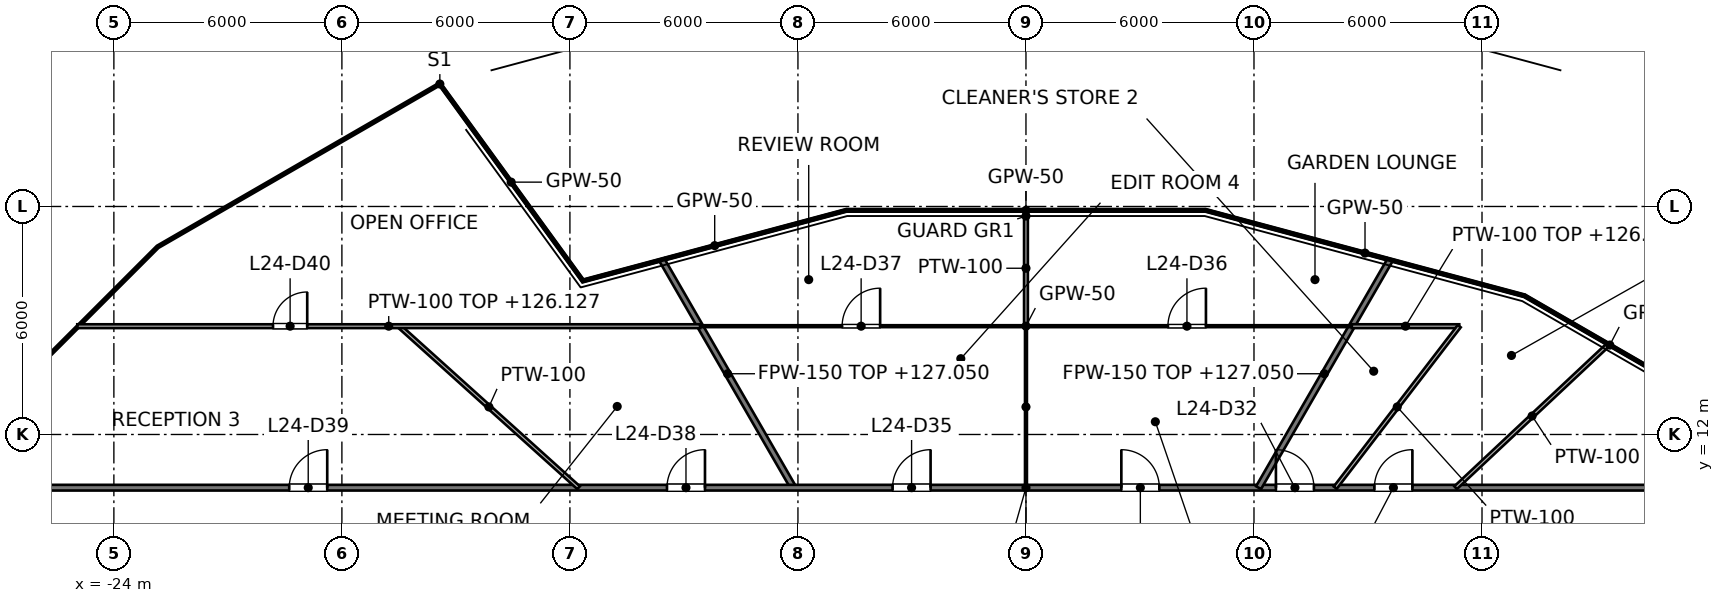
"""IFC4 building model, lengths in metres.
Left out: names, types, materials, properties, quantities, classifications, styles, units other than length and angle.
Written with IfcOpenShell. Run it as: python <this file> out.ifc"""

import sys

from ifc_helpers import new_model, si_unit, direction, frame, frame_2d, origin, place, context, subcontext, project, spatial, rectangle, extrude, element, fill, save


model = new_model("IFC4")
c1 = context("Model", 3, precision=1e-05, world=origin(), true_north=direction((0.0, 1.0)))
c2 = subcontext(c1, "Body", "Model", "MODEL_VIEW")
j1 = project(units=[si_unit("LENGTHUNIT", "METRE"), si_unit("PLANEANGLEUNIT", "RADIAN")], contexts=[c1])
p1 = place(None, origin())
s1 = spatial("IfcSite", under=j1, at=p1, CompositionType="ELEMENT")
p2 = place(p1, origin())
s2 = spatial("IfcBuilding", under=s1, at=p2, CompositionType="ELEMENT")
p3 = place(p2, frame((0.0, 0.0, 123.0)))
s3 = spatial("IfcBuildingStorey", under=s2, at=p3, CompositionType="ELEMENT", Elevation=123.0)
p4 = place(p3, frame((-9.582, 16.597, 0.0), z_axis=(0.0, 0.0, 1.0), x_axis=(0.500014420154, -0.866017078145, 0.0)))
e1 = element("IfcWall", 1, at=p4, inside=s3, PredefinedType="PARTITIONING", context=c2, shape_type="SweptSolid", body=[
    extrude(rectangle(XDim=6.925, YDim=0.15, at=frame_2d((3.462, 0.0))), origin(), (0.0, 0.0, 1.0), 4.05),
])
p5 = place(p3, frame((-26.0, 10.6, 0.0), z_axis=(0.0, 0.0, 1.0), x_axis=(1.0, 0.0, 0.0)))
e2 = element("IfcWall", 2, at=p5, inside=s3, PredefinedType="PARTITIONING", context=c2, shape_type="SweptSolid", body=[
    extrude(rectangle(XDim=52.0, YDim=0.15, at=frame_2d((26.0, 0.0))), origin(), (0.0, 0.0, 1.0), 3.127),
])
p6 = place(p5, frame((44.053, 0.0, 0.0)))
e3 = element("IfcOpeningElement", 3, at=p6, cuts=e2, PredefinedType="OPENING", context=c2, shape_type="SweptSolid", body=[
    extrude(rectangle(XDim=1.2, YDim=2.1, at=frame_2d((0.6, 1.05))), frame((0.0, 0.075, 0.0), z_axis=(0.0, -1.0, 0.0), x_axis=(1.0, 0.0, 0.0)), (0.0, 0.0, 1.0), 0.15),
])
p7 = place(p5, frame((35.168, 0.0, 0.0)))
e4 = element("IfcOpeningElement", 4, at=p7, cuts=e2, PredefinedType="OPENING", context=c2, shape_type="SweptSolid", body=[
    extrude(rectangle(XDim=1.0, YDim=2.1, at=frame_2d((0.5, 1.05))), frame((0.0, 0.075, 0.0), z_axis=(0.0, -1.0, 0.0), x_axis=(1.0, 0.0, 0.0)), (0.0, 0.0, 1.0), 0.15),
])
p8 = place(p5, frame((32.577, 0.0, 0.0)))
e5 = element("IfcOpeningElement", 5, at=p8, cuts=e2, PredefinedType="OPENING", context=c2, shape_type="SweptSolid", body=[
    extrude(rectangle(XDim=1.0, YDim=2.1, at=frame_2d((0.5, 1.05))), frame((0.0, 0.075, 0.0), z_axis=(0.0, -1.0, 0.0), x_axis=(1.0, 0.0, 0.0)), (0.0, 0.0, 1.0), 0.15),
])
p9 = place(p5, frame((28.51, 0.0, 0.0)))
e6 = element("IfcOpeningElement", 6, at=p9, cuts=e2, PredefinedType="OPENING", context=c2, shape_type="SweptSolid", body=[
    extrude(rectangle(XDim=1.0, YDim=2.1, at=frame_2d((0.5, 1.05))), frame((0.0, 0.075, 0.0), z_axis=(0.0, -1.0, 0.0), x_axis=(1.0, 0.0, 0.0)), (0.0, 0.0, 1.0), 0.15),
])
p10 = place(p5, frame((22.49, 0.0, 0.0)))
e7 = element("IfcOpeningElement", 7, at=p10, cuts=e2, PredefinedType="OPENING", context=c2, shape_type="SweptSolid", body=[
    extrude(rectangle(XDim=1.0, YDim=2.1, at=frame_2d((0.5, 1.05))), frame((0.0, 0.075, 0.0), z_axis=(0.0, -1.0, 0.0), x_axis=(1.0, 0.0, 0.0)), (0.0, 0.0, 1.0), 0.15),
])
p11 = place(p5, frame((16.554, 0.0, 0.0)))
e8 = element("IfcOpeningElement", 8, at=p11, cuts=e2, PredefinedType="OPENING", context=c2, shape_type="SweptSolid", body=[
    extrude(rectangle(XDim=1.0, YDim=2.1, at=frame_2d((0.5, 1.05))), frame((0.0, 0.075, 0.0), z_axis=(0.0, -1.0, 0.0), x_axis=(1.0, 0.0, 0.0)), (0.0, 0.0, 1.0), 0.15),
])
p12 = place(p5, frame((6.614, 0.0, 0.0)))
e9 = element("IfcOpeningElement", 9, at=p12, cuts=e2, PredefinedType="OPENING", context=c2, shape_type="SweptSolid", body=[
    extrude(rectangle(XDim=1.0, YDim=2.1, at=frame_2d((0.5, 1.05))), frame((0.0, 0.075, 0.0), z_axis=(0.0, -1.0, 0.0), x_axis=(1.0, 0.0, 0.0)), (0.0, 0.0, 1.0), 0.15),
])
p13 = place(p3, frame((6.12, 10.6, 0.0), z_axis=(0.0, 0.0, 1.0), x_axis=(0.500029687554, 0.866008262989, 0.0)))
e10 = element("IfcWall", 10, at=p13, inside=s3, PredefinedType="PARTITIONING", context=c2, shape_type="SweptSolid", body=[
    extrude(rectangle(XDim=6.924, YDim=0.15, at=frame_2d((3.462, 0.0))), origin(), (0.0, 0.0, 1.0), 4.05),
])
p14 = place(p3, frame((-15.435, 21.24, 0.0), z_axis=(0.0, 0.0, 1.0), x_axis=(0.587866723906, -0.808957795514, 0.0)))
e11 = element("IfcWall", 11, at=p14, inside=s3, PredefinedType="PARTITIONING", context=c2, shape_type="SweptSolid", body=[
    extrude(rectangle(XDim=6.427, YDim=0.05, at=frame_2d((3.213, 0.0))), origin(), (0.0, 0.0, 1.0), 3.127),
])
p15 = place(p3, frame((13.119, 15.649, 0.0), z_axis=(0.0, 0.0, 1.0), x_axis=(0.866054574236, -0.499949471892, 0.0)))
e12 = element("IfcWall", 12, at=p15, inside=s3, PredefinedType="PARTITIONING", context=c2, shape_type="SweptSolid", body=[
    extrude(rectangle(XDim=5.182, YDim=0.05, at=frame_2d((2.591, 0.0))), origin(), (0.0, 0.0, 1.0), 3.127),
])
p16 = place(p3, frame((4.724, 17.899, 0.0), z_axis=(0.0, 0.0, 1.0), x_axis=(0.965907796442, -0.258886324037, 0.0)))
e13 = element("IfcWall", 13, at=p16, inside=s3, PredefinedType="PARTITIONING", context=c2, shape_type="SweptSolid", body=[
    extrude(rectangle(XDim=8.691, YDim=0.05, at=frame_2d((4.346, 0.0))), origin(), (0.0, 0.0, 1.0), 3.127),
])
p17 = place(p3, frame((-8.573, 14.85, 0.0), z_axis=(0.0, 0.0, 1.0), x_axis=(1.0, 0.0, 0.0)))
e14 = element("IfcWall", 14, at=p17, inside=s3, PredefinedType="PARTITIONING", context=c2, shape_type="SweptSolid", body=[
    extrude(rectangle(XDim=17.146, YDim=0.05, at=frame_2d((8.573, 0.0))), origin(), (0.0, 0.0, 1.0), 3.127),
])
p18 = place(p17, frame((12.309, 0.0, 0.0)))
e15 = element("IfcOpeningElement", 15, at=p18, cuts=e14, PredefinedType="OPENING", context=c2, shape_type="SweptSolid", body=[
    extrude(rectangle(XDim=1.0, YDim=2.1, at=frame_2d((0.5, 1.05))), frame((0.0, 0.025, 0.0), z_axis=(0.0, -1.0, 0.0), x_axis=(1.0, 0.0, 0.0)), (0.0, 0.0, 1.0), 0.05),
])
p19 = place(p17, frame((3.736, 0.0, 0.0)))
e16 = element("IfcOpeningElement", 16, at=p19, cuts=e14, PredefinedType="OPENING", context=c2, shape_type="SweptSolid", body=[
    extrude(rectangle(XDim=1.0, YDim=2.1, at=frame_2d((0.5, 1.05))), frame((0.0, 0.025, 0.0), z_axis=(0.0, -1.0, 0.0), x_axis=(1.0, 0.0, 0.0)), (0.0, 0.0, 1.0), 0.05),
])
p20 = place(p3, frame((-4.724, 17.899, 0.0), z_axis=(0.0, 0.0, 1.0), x_axis=(1.0, 0.0, 0.0)))
e17 = element("IfcWall", 17, at=p20, inside=s3, PredefinedType="PARTITIONING", context=c2, shape_type="SweptSolid", body=[
    extrude(rectangle(XDim=9.448, YDim=0.05, at=frame_2d((4.724, 0.0))), origin(), (0.0, 0.0, 1.0), 3.127),
])
p21 = place(p3, frame((-11.657, 16.041, 0.0), z_axis=(0.0, 0.0, 1.0), x_axis=(0.965916924206, 0.258852265845, 0.0)))
e18 = element("IfcWall", 18, at=p21, inside=s3, PredefinedType="PARTITIONING", context=c2, shape_type="SweptSolid", body=[
    extrude(rectangle(XDim=7.177, YDim=0.05, at=frame_2d((3.589, 0.0))), origin(), (0.0, 0.0, 1.0), 3.127),
])
p22 = place(p3, frame((0.0, 10.6, 0.0), z_axis=(0.0, 0.0, 1.0), x_axis=(0.0, 1.0, 0.0)))
e19 = element("IfcWall", 19, at=p22, inside=s3, PredefinedType="PARTITIONING", context=c2, shape_type="SweptSolid", body=[
    extrude(rectangle(XDim=4.25, YDim=0.05, at=frame_2d((2.125, 0.0))), origin(), (0.0, 0.0, 1.0), 4.05),
])
p23 = place(p3, frame((-16.492, 14.85, 0.0), z_axis=(0.0, 0.0, 1.0), x_axis=(0.74313548605, -0.669140978698, 0.0)))
e20 = element("IfcWall", 20, at=p23, inside=s3, PredefinedType="PARTITIONING", context=c2, shape_type="SweptSolid", body=[
    extrude(rectangle(XDim=6.351, YDim=0.1, at=frame_2d((3.176, 0.0))), origin(), (0.0, 0.0, 1.0), 4.05),
])
p24 = place(p3, frame((-24.963, 14.85, 0.0), z_axis=(0.0, 0.0, 1.0), x_axis=(1.0, 0.0, 0.0)))
e21 = element("IfcWall", 21, at=p24, inside=s3, PredefinedType="PARTITIONING", context=c2, shape_type="SweptSolid", body=[
    extrude(rectangle(XDim=16.39, YDim=0.1, at=frame_2d((8.195, 0.0))), origin(), (0.0, 0.0, 1.0), 3.127),
])
p25 = place(p24, frame((5.151, 0.0, 0.0)))
e22 = element("IfcOpeningElement", 22, at=p25, cuts=e21, PredefinedType="OPENING", context=c2, shape_type="SweptSolid", body=[
    extrude(rectangle(XDim=0.9, YDim=2.1, at=frame_2d((0.45, 1.05))), frame((0.0, 0.05, 0.0), z_axis=(0.0, -1.0, 0.0), x_axis=(1.0, 0.0, 0.0)), (0.0, 0.0, 1.0), 0.1),
])
p26 = place(p3, frame((8.573, 14.85, 0.0), z_axis=(0.0, 0.0, 1.0), x_axis=(1.0, 0.0, 0.0)))
e23 = element("IfcWall", 23, at=p26, inside=s3, PredefinedType="PARTITIONING", context=c2, shape_type="SweptSolid", body=[
    extrude(rectangle(XDim=2.828, YDim=0.1, at=frame_2d((1.414, 0.0))), origin(), (0.0, 0.0, 1.0), 3.127),
])
p27 = place(p3, frame((11.306, 10.6, 0.0), z_axis=(0.0, 0.0, 1.0), x_axis=(0.72951097982, 0.683969100415, 0.0)))
e24 = element("IfcWall", 24, at=p27, inside=s3, PredefinedType="PARTITIONING", context=c2, shape_type="SweptSolid", body=[
    extrude(rectangle(XDim=5.516, YDim=0.1, at=frame_2d((2.758, 0.0))), origin(), (0.0, 0.0, 1.0), 4.05),
])
p28 = place(p3, frame((8.138, 10.6, 0.0), z_axis=(0.0, 0.0, 1.0), x_axis=(0.608972822202, 0.793191087834, 0.0)))
e25 = element("IfcWall", 25, at=p28, inside=s3, PredefinedType="PARTITIONING", context=c2, shape_type="SweptSolid", body=[
    extrude(rectangle(XDim=5.358, YDim=0.1, at=frame_2d((2.679, 0.0))), origin(), (0.0, 0.0, 1.0), 4.05),
])
p29 = place(p3, frame((0.0, 14.85, 0.0), z_axis=(0.0, 0.0, 1.0), x_axis=(0.0, 1.0, 0.0)))
e26 = element("IfcWall", 26, at=p29, inside=s3, PredefinedType="PARTITIONING", context=c2, shape_type="SweptSolid", body=[
    extrude(rectangle(XDim=3.049, YDim=0.1, at=frame_2d((1.524, 0.0))), origin(), (0.0, 0.0, 1.0), 4.05),
])
p30 = place(p7, origin())
e27 = element("IfcDoor", 27, at=p30, inside=s3, OperationType="SINGLE_SWING_RIGHT", PredefinedType="DOOR", context=c2, shape_type="SweptSolid", body=[
    extrude(rectangle(XDim=1.0, YDim=2.1, at=frame_2d((0.5, 1.05))), frame((0.0, 0.025, 0.0), z_axis=(0.0, -1.0, 0.0), x_axis=(1.0, 0.0, 0.0)), (0.0, 0.0, 1.0), 0.05),
])
fill(e4, e27)
p31 = place(p8, origin())
e28 = element("IfcDoor", 28, at=p31, inside=s3, OperationType="SINGLE_SWING_LEFT", PredefinedType="DOOR", context=c2, shape_type="SweptSolid", body=[
    extrude(rectangle(XDim=1.0, YDim=2.1, at=frame_2d((0.5, 1.05))), frame((0.0, 0.025, 0.0), z_axis=(0.0, -1.0, 0.0), x_axis=(1.0, 0.0, 0.0)), (0.0, 0.0, 1.0), 0.05),
])
fill(e5, e28)
p32 = place(p9, origin())
e29 = element("IfcDoor", 29, at=p32, inside=s3, OperationType="SINGLE_SWING_LEFT", PredefinedType="DOOR", context=c2, shape_type="SweptSolid", body=[
    extrude(rectangle(XDim=1.0, YDim=2.1, at=frame_2d((0.5, 1.05))), frame((0.0, 0.025, 0.0), z_axis=(0.0, -1.0, 0.0), x_axis=(1.0, 0.0, 0.0)), (0.0, 0.0, 1.0), 0.05),
])
fill(e6, e29)
p33 = place(p10, origin())
e30 = element("IfcDoor", 30, at=p33, inside=s3, OperationType="SINGLE_SWING_RIGHT", PredefinedType="DOOR", context=c2, shape_type="SweptSolid", body=[
    extrude(rectangle(XDim=1.0, YDim=2.1, at=frame_2d((0.5, 1.05))), frame((0.0, 0.025, 0.0), z_axis=(0.0, -1.0, 0.0), x_axis=(1.0, 0.0, 0.0)), (0.0, 0.0, 1.0), 0.05),
])
fill(e7, e30)
p34 = place(p18, origin())
e31 = element("IfcDoor", 31, at=p34, inside=s3, OperationType="SINGLE_SWING_RIGHT", PredefinedType="DOOR", context=c2, shape_type="SweptSolid", body=[
    extrude(rectangle(XDim=1.0, YDim=2.1, at=frame_2d((0.5, 1.05))), frame((0.0, 0.025, 0.0), z_axis=(0.0, -1.0, 0.0), x_axis=(1.0, 0.0, 0.0)), (0.0, 0.0, 1.0), 0.05),
])
fill(e15, e31)
p35 = place(p19, origin())
e32 = element("IfcDoor", 32, at=p35, inside=s3, OperationType="SINGLE_SWING_RIGHT", PredefinedType="DOOR", context=c2, shape_type="SweptSolid", body=[
    extrude(rectangle(XDim=1.0, YDim=2.1, at=frame_2d((0.5, 1.05))), frame((0.0, 0.025, 0.0), z_axis=(0.0, -1.0, 0.0), x_axis=(1.0, 0.0, 0.0)), (0.0, 0.0, 1.0), 0.05),
])
fill(e16, e32)
p36 = place(p11, origin())
e33 = element("IfcDoor", 33, at=p36, inside=s3, OperationType="SINGLE_SWING_RIGHT", PredefinedType="DOOR", context=c2, shape_type="SweptSolid", body=[
    extrude(rectangle(XDim=1.0, YDim=2.1, at=frame_2d((0.5, 1.05))), frame((0.0, 0.025, 0.0), z_axis=(0.0, -1.0, 0.0), x_axis=(1.0, 0.0, 0.0)), (0.0, 0.0, 1.0), 0.05),
])
fill(e8, e33)
p37 = place(p12, origin())
e34 = element("IfcDoor", 34, at=p37, inside=s3, OperationType="SINGLE_SWING_RIGHT", PredefinedType="DOOR", context=c2, shape_type="SweptSolid", body=[
    extrude(rectangle(XDim=1.0, YDim=2.1, at=frame_2d((0.5, 1.05))), frame((0.0, 0.025, 0.0), z_axis=(0.0, -1.0, 0.0), x_axis=(1.0, 0.0, 0.0)), (0.0, 0.0, 1.0), 0.05),
])
fill(e9, e34)
p38 = place(p25, origin())
e35 = element("IfcDoor", 35, at=p38, inside=s3, OperationType="SINGLE_SWING_RIGHT", PredefinedType="DOOR", context=c2, shape_type="SweptSolid", body=[
    extrude(rectangle(XDim=0.9, YDim=2.1, at=frame_2d((0.45, 1.05))), frame((0.0, 0.025, 0.0), z_axis=(0.0, -1.0, 0.0), x_axis=(1.0, 0.0, 0.0)), (0.0, 0.0, 1.0), 0.05),
])
fill(e22, e35)
save(model, sys.argv[1])
